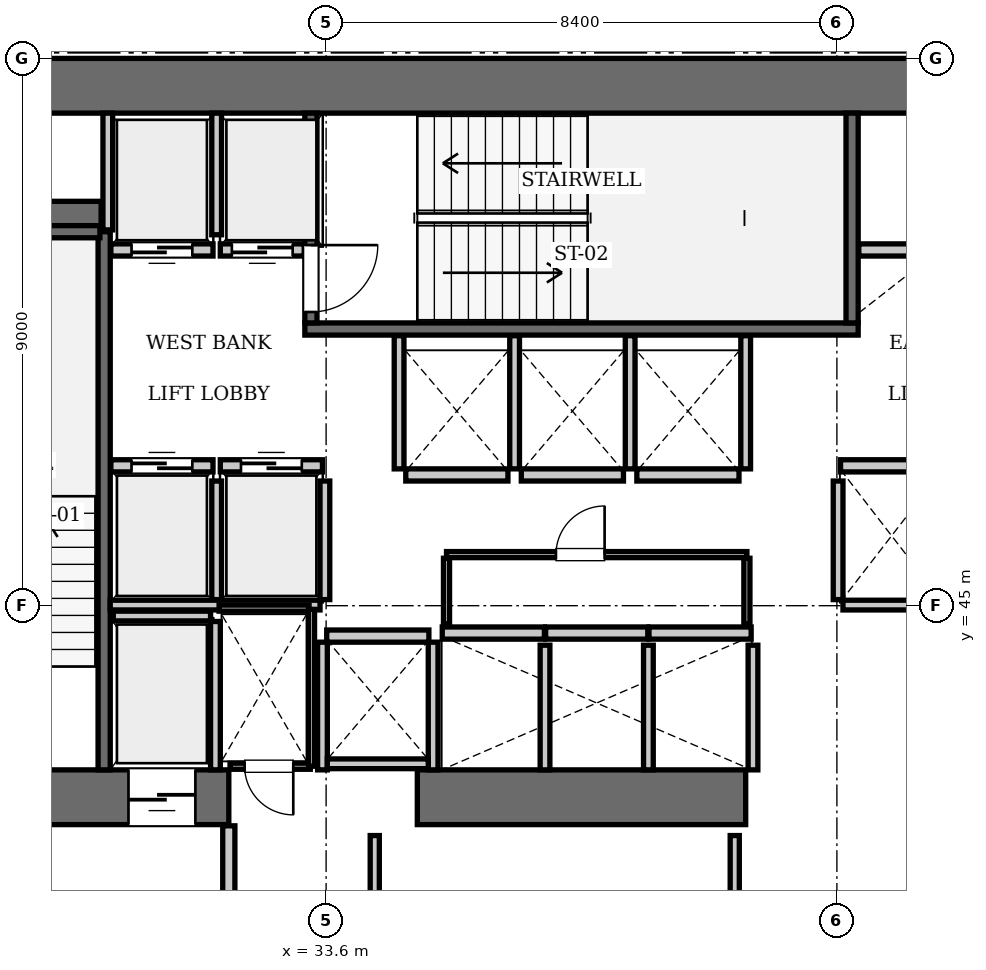
"""IFC4 building model, lengths in metres.
Left out: names, types, materials, properties, quantities, classifications, styles, units other than length and angle.
Written with IfcOpenShell. Run it as: python <this file> out.ifc"""

import sys

from ifc_helpers import new_model, si_unit, direction, frame, frame_2d, origin, place, context, subcontext, project, spatial, rectangle, extrude, element, fill, save


model = new_model("IFC4")
c1 = context("Model", 3, precision=1e-05, world=origin(), true_north=direction((0.0, 1.0)))
c2 = subcontext(c1, "Body", "Model", "MODEL_VIEW")
j1 = project(units=[si_unit("LENGTHUNIT", "METRE"), si_unit("PLANEANGLEUNIT", "RADIAN")], contexts=[c1])
p1 = place(None, origin())
s1 = spatial("IfcSite", under=j1, at=p1, CompositionType="ELEMENT")
p2 = place(p1, origin())
s2 = spatial("IfcBuilding", under=s1, at=p2, CompositionType="ELEMENT")
p3 = place(p2, frame((0.0, 0.0, 100.1)))
s3 = spatial("IfcBuildingStorey", under=s2, at=p3, CompositionType="ELEMENT", Elevation=100.1)
p4 = place(p3, frame((25.2, 53.55, 0.0), z_axis=(0.0, 0.0, 1.0), x_axis=(1.0, 0.0, 0.0)))
e1 = element("IfcWall", 1, at=p4, inside=s3, PredefinedType="SHEAR", context=c2, shape_type="SweptSolid", body=[
    extrude(rectangle(XDim=25.2, YDim=0.9, at=frame_2d((12.6, 0.0))), origin(), (0.0, 0.0, 1.0), 3.85),
])
p5 = place(p3, frame((25.2, 41.85, 0.0), z_axis=(0.0, 0.0, 1.0), x_axis=(1.0, 0.0, 0.0)))
e2 = element("IfcWall", 2, at=p5, inside=s3, PredefinedType="SHEAR", context=c2, shape_type="SweptSolid", body=[
    extrude(rectangle(XDim=6.8, YDim=0.9, at=frame_2d((3.4, 0.0))), origin(), (0.0, 0.0, 1.0), 3.85),
])
p6 = place(p5, frame((1.65, 0.0, 0.0)))
e3 = element("IfcOpeningElement", 3, at=p6, cuts=e2, PredefinedType="OPENING", context=c2, shape_type="SweptSolid", body=[
    extrude(rectangle(XDim=1.15, YDim=2.15, at=frame_2d((0.575, 1.075))), frame((0.0, 0.46, 0.0), z_axis=(0.0, -1.0, 0.0), x_axis=(1.0, 0.0, 0.0)), (0.0, 0.0, 1.0), 0.92),
])
p7 = place(p5, frame((5.15, 0.0, 0.0)))
e4 = element("IfcOpeningElement", 4, at=p7, cuts=e2, PredefinedType="OPENING", context=c2, shape_type="SweptSolid", body=[
    extrude(rectangle(XDim=1.1, YDim=2.2, at=frame_2d((0.55, 1.1))), frame((0.0, 0.46, 0.0), z_axis=(0.0, -1.0, 0.0), x_axis=(1.0, 0.0, 0.0)), (0.0, 0.0, 1.0), 0.92),
])
p8 = place(p3, frame((35.1, 41.85, 0.0), z_axis=(0.0, 0.0, 1.0), x_axis=(1.0, 0.0, 0.0)))
e5 = element("IfcWall", 5, at=p8, inside=s3, PredefinedType="SHEAR", context=c2, shape_type="SweptSolid", body=[
    extrude(rectangle(XDim=5.4, YDim=0.9, at=frame_2d((2.7, 0.0))), origin(), (0.0, 0.0, 1.0), 3.85),
])
p9 = place(p3, frame((26.1, 51.4, 0.0), z_axis=(0.0, 0.0, 1.0), x_axis=(1.0, 0.0, 0.0)))
e6 = element("IfcWall", 6, at=p9, inside=s3, PredefinedType="SHEAR", context=c2, shape_type="SweptSolid", body=[
    extrude(rectangle(XDim=3.8, YDim=0.5, at=frame_2d((1.9, 0.0))), origin(), (0.0, 0.0, 1.0), 3.85),
])
p10 = place(p3, frame((29.95, 42.3, 0.0), z_axis=(0.0, 0.0, 1.0), x_axis=(0.0, 1.0, 0.0)))
e7 = element("IfcWall", 7, at=p10, inside=s3, PredefinedType="SOLIDWALL", context=c2, shape_type="SweptSolid", body=[
    extrude(rectangle(XDim=8.85, YDim=0.2, at=frame_2d((4.425, 0.0))), origin(), (0.0, 0.0, 1.0), 3.61),
])
p11 = place(p3, frame((26.38, 51.15, 0.0), z_axis=(0.0, 0.0, 1.0), x_axis=(1.0, 0.0, 0.0)))
e8 = element("IfcWall", 8, at=p11, inside=s3, PredefinedType="SOLIDWALL", context=c2, shape_type="SweptSolid", body=[
    extrude(rectangle(XDim=3.5, YDim=0.2, at=frame_2d((1.75, 0.0))), origin(), (0.0, 0.0, 1.0), 3.61),
])
p12 = place(p3, frame((33.25, 49.55, 0.0), z_axis=(0.0, 0.0, 1.0), x_axis=(1.0, 0.0, 0.0)))
e9 = element("IfcWall", 9, at=p12, inside=s3, PredefinedType="SOLIDWALL", context=c2, shape_type="SweptSolid", body=[
    extrude(rectangle(XDim=9.1, YDim=0.2, at=frame_2d((4.55, 0.0))), origin(), (0.0, 0.0, 1.0), 3.61),
])
p13 = place(p3, frame((42.25, 49.65, 0.0), z_axis=(0.0, 0.0, 1.0), x_axis=(0.0, 1.0, 0.0)))
e10 = element("IfcWall", 10, at=p13, inside=s3, PredefinedType="SOLIDWALL", context=c2, shape_type="SweptSolid", body=[
    extrude(rectangle(XDim=3.45, YDim=0.2, at=frame_2d((1.725, 0.0))), origin(), (0.0, 0.0, 1.0), 3.61),
])
p14 = place(p3, frame((33.35, 49.65, 0.0), z_axis=(0.0, 0.0, 1.0), x_axis=(0.0, 1.0, 0.0)))
e11 = element("IfcWall", 11, at=p14, inside=s3, PredefinedType="SOLIDWALL", context=c2, shape_type="SweptSolid", body=[
    extrude(rectangle(XDim=3.45, YDim=0.2, at=frame_2d((1.725, 0.0))), origin(), (0.0, 0.0, 1.0), 3.61),
])
p15 = place(p14, frame((0.18, 0.0, 0.0)))
e12 = element("IfcOpeningElement", 12, at=p15, cuts=e11, PredefinedType="OPENING", context=c2, shape_type="SweptSolid", body=[
    extrude(rectangle(XDim=1.1, YDim=2.15, at=frame_2d((0.55, 1.075))), frame((0.0, 0.11, 0.0), z_axis=(0.0, -1.0, 0.0), x_axis=(1.0, 0.0, 0.0)), (0.0, 0.0, 1.0), 0.22),
])
p16 = place(p3, frame((30.06, 47.3, 0.0), z_axis=(0.0, 0.0, 1.0), x_axis=(1.0, 0.0, 0.0)))
e13 = element("IfcWall", 13, at=p16, inside=s3, PredefinedType="SOLIDWALL", context=c2, shape_type="SweptSolid", body=[
    extrude(rectangle(XDim=1.68, YDim=0.2, at=frame_2d((0.84, 0.0))), origin(), (0.0, 0.0, 1.0), 3.61),
])
p17 = place(p16, frame((0.34, 0.0, 0.0)))
e14 = element("IfcOpeningElement", 14, at=p17, cuts=e13, PredefinedType="OPENING", context=c2, shape_type="SweptSolid", body=[
    extrude(rectangle(XDim=1.0, YDim=2.15, at=frame_2d((0.5, 1.075))), frame((0.0, 0.11, 0.0), z_axis=(0.0, -1.0, 0.0), x_axis=(1.0, 0.0, 0.0)), (0.0, 0.0, 1.0), 0.22),
])
p18 = place(p3, frame((31.86, 47.3, 0.0), z_axis=(0.0, 0.0, 1.0), x_axis=(1.0, 0.0, 0.0)))
e15 = element("IfcWall", 15, at=p18, inside=s3, PredefinedType="SOLIDWALL", context=c2, shape_type="SweptSolid", body=[
    extrude(rectangle(XDim=1.68, YDim=0.2, at=frame_2d((0.84, 0.0))), origin(), (0.0, 0.0, 1.0), 3.61),
])
p19 = place(p18, frame((0.34, 0.0, 0.0)))
e16 = element("IfcOpeningElement", 16, at=p19, cuts=e15, PredefinedType="OPENING", context=c2, shape_type="SweptSolid", body=[
    extrude(rectangle(XDim=1.0, YDim=2.15, at=frame_2d((0.5, 1.075))), frame((0.0, 0.11, 0.0), z_axis=(0.0, -1.0, 0.0), x_axis=(1.0, 0.0, 0.0)), (0.0, 0.0, 1.0), 0.22),
])
p20 = place(p3, frame((30.06, 50.85, 0.0), z_axis=(0.0, 0.0, 1.0), x_axis=(1.0, 0.0, 0.0)))
e17 = element("IfcWall", 17, at=p20, inside=s3, PredefinedType="SOLIDWALL", context=c2, shape_type="SweptSolid", body=[
    extrude(rectangle(XDim=1.68, YDim=0.2, at=frame_2d((0.84, 0.0))), origin(), (0.0, 0.0, 1.0), 3.61),
])
p21 = place(p20, frame((0.34, 0.0, 0.0)))
e18 = element("IfcOpeningElement", 18, at=p21, cuts=e17, PredefinedType="OPENING", context=c2, shape_type="SweptSolid", body=[
    extrude(rectangle(XDim=1.0, YDim=2.15, at=frame_2d((0.5, 1.075))), frame((0.0, 0.11, 0.0), z_axis=(0.0, -1.0, 0.0), x_axis=(1.0, 0.0, 0.0)), (0.0, 0.0, 1.0), 0.22),
])
p22 = place(p3, frame((31.86, 50.85, 0.0), z_axis=(0.0, 0.0, 1.0), x_axis=(1.0, 0.0, 0.0)))
e19 = element("IfcWall", 19, at=p22, inside=s3, PredefinedType="SOLIDWALL", context=c2, shape_type="SweptSolid", body=[
    extrude(rectangle(XDim=1.38, YDim=0.2, at=frame_2d((0.69, 0.0))), origin(), (0.0, 0.0, 1.0), 3.61),
])
p23 = place(p22, frame((0.19, 0.0, 0.0)))
e20 = element("IfcOpeningElement", 20, at=p23, cuts=e19, PredefinedType="OPENING", context=c2, shape_type="SweptSolid", body=[
    extrude(rectangle(XDim=1.0, YDim=2.15, at=frame_2d((0.5, 1.075))), frame((0.0, 0.11, 0.0), z_axis=(0.0, -1.0, 0.0), x_axis=(1.0, 0.0, 0.0)), (0.0, 0.0, 1.0), 0.22),
])
p24 = place(p3, frame((42.06, 47.3, 0.0), z_axis=(0.0, 0.0, 1.0), x_axis=(1.0, 0.0, 0.0)))
e21 = element("IfcWall", 21, at=p24, inside=s3, PredefinedType="SOLIDWALL", context=c2, shape_type="SweptSolid", body=[
    extrude(rectangle(XDim=1.68, YDim=0.2, at=frame_2d((0.84, 0.0))), origin(), (0.0, 0.0, 1.0), 3.61),
])
p25 = place(p3, frame((42.36, 50.85, 0.0), z_axis=(0.0, 0.0, 1.0), x_axis=(1.0, 0.0, 0.0)))
e22 = element("IfcWall", 22, at=p25, inside=s3, PredefinedType="SOLIDWALL", context=c2, shape_type="SweptSolid", body=[
    extrude(rectangle(XDim=1.38, YDim=0.2, at=frame_2d((0.69, 0.0))), origin(), (0.0, 0.0, 1.0), 3.61),
])
for number, where, z_axis, x_axis in (
    (23, (35.51, 44.55, 0.0), (0.0, 0.0, 1.0), (1.0, 0.0, 0.0)),
    (24, (37.21, 44.55, 0.0), (0.0, 0.0, 1.0), (1.0, 0.0, 0.0)),
):
    element("IfcWall", number, at=place(p3, frame(where, z_axis=z_axis, x_axis=x_axis)), inside=s3, PredefinedType="SOLIDWALL", context=c2, shape_type="SweptSolid", body=[
        extrude(rectangle(XDim=1.68, YDim=0.2, at=frame_2d((0.84, 0.0))), origin(), (0.0, 0.0, 1.0), 3.61),
    ])
for number, where, z_axis, x_axis in (
    (25, (38.91, 44.55, 0.0), (0.0, 0.0, 1.0), (1.0, 0.0, 0.0)),
    (26, (34.91, 47.15, 0.0), (0.0, 0.0, 1.0), (1.0, 0.0, 0.0)),
):
    element("IfcWall", number, at=place(p3, frame(where, z_axis=z_axis, x_axis=x_axis)), inside=s3, PredefinedType="SOLIDWALL", context=c2, shape_type="SweptSolid", body=[
        extrude(rectangle(XDim=1.68, YDim=0.2, at=frame_2d((0.84, 0.0))), origin(), (0.0, 0.0, 1.0), 3.61),
    ])
for number, where, z_axis, x_axis in (
    (27, (36.81, 47.15, 0.0), (0.0, 0.0, 1.0), (1.0, 0.0, 0.0)),
    (28, (38.71, 47.15, 0.0), (0.0, 0.0, 1.0), (1.0, 0.0, 0.0)),
    (29, (33.61, 44.5, 0.0), (0.0, 0.0, 1.0), (1.0, 0.0, 0.0)),
):
    element("IfcWall", number, at=place(p3, frame(where, z_axis=z_axis, x_axis=x_axis)), inside=s3, PredefinedType="SOLIDWALL", context=c2, shape_type="SweptSolid", body=[
        extrude(rectangle(XDim=1.68, YDim=0.2, at=frame_2d((0.84, 0.0))), origin(), (0.0, 0.0, 1.0), 3.61),
    ])
p26 = place(p3, frame((30.1, 44.83, 0.0), z_axis=(0.0, 0.0, 1.0), x_axis=(1.0, 0.0, 0.0)))
e30 = element("IfcWall", 30, at=p26, inside=s3, PredefinedType="SOLIDWALL", context=c2, shape_type="SweptSolid", body=[
    extrude(rectangle(XDim=1.6, YDim=0.16, at=frame_2d((0.8, 0.0))), origin(), (0.0, 0.0, 1.0), 3.61),
])
p27 = place(p3, frame((31.78, 42.3, 0.0), z_axis=(0.0, 0.0, 1.0), x_axis=(0.0, 1.0, 0.0)))
e31 = element("IfcWall", 31, at=p27, inside=s3, PredefinedType="SOLIDWALL", context=c2, shape_type="SweptSolid", body=[
    extrude(rectangle(XDim=2.44, YDim=0.16, at=frame_2d((1.22, 0.0))), origin(), (0.0, 0.0, 1.0), 3.61),
])
for number, where, z_axis, x_axis in (
    (32, (31.8, 45.1, 0.0), (0.0, 0.0, 1.0), (0.0, 1.0, 0.0)),
    (33, (33.58, 45.1, 0.0), (0.0, 0.0, 1.0), (0.0, 1.0, 0.0)),
):
    element("IfcWall", number, at=place(p3, frame(where, z_axis=z_axis, x_axis=x_axis)), inside=s3, PredefinedType="SOLIDWALL", context=c2, shape_type="SweptSolid", body=[
        extrude(rectangle(XDim=1.95, YDim=0.16, at=frame_2d((0.975, 0.0))), origin(), (0.0, 0.0, 1.0), 3.61),
    ])
p28 = place(p3, frame((30.05, 45.01, 0.0), z_axis=(0.0, 0.0, 1.0), x_axis=(1.0, 0.0, 0.0)))
e34 = element("IfcWall", 34, at=p28, inside=s3, PredefinedType="SOLIDWALL", context=c2, shape_type="SweptSolid", body=[
    extrude(rectangle(XDim=3.45, YDim=0.16, at=frame_2d((1.725, 0.0))), origin(), (0.0, 0.0, 1.0), 3.61),
])
p29 = place(p3, frame((30.01, 51.18, 0.0), z_axis=(0.0, 0.0, 1.0), x_axis=(0.0, 1.0, 0.0)))
e35 = element("IfcWall", 35, at=p29, inside=s3, PredefinedType="SOLIDWALL", context=c2, shape_type="SweptSolid", body=[
    extrude(rectangle(XDim=1.92, YDim=0.16, at=frame_2d((0.96, 0.0))), origin(), (0.0, 0.0, 1.0), 3.61),
])
p30 = place(p3, frame((31.8, 51.1, 0.0), z_axis=(0.0, 0.0, 1.0), x_axis=(0.0, 1.0, 0.0)))
e36 = element("IfcWall", 36, at=p30, inside=s3, PredefinedType="SOLIDWALL", context=c2, shape_type="SweptSolid", body=[
    extrude(rectangle(XDim=2.0, YDim=0.16, at=frame_2d((1.0, 0.0))), origin(), (0.0, 0.0, 1.0), 3.61),
])
p31 = place(p3, frame((42.02, 45.1, 0.0), z_axis=(0.0, 0.0, 1.0), x_axis=(0.0, 1.0, 0.0)))
e37 = element("IfcWall", 37, at=p31, inside=s3, PredefinedType="SOLIDWALL", context=c2, shape_type="SweptSolid", body=[
    extrude(rectangle(XDim=1.95, YDim=0.16, at=frame_2d((0.975, 0.0))), origin(), (0.0, 0.0, 1.0), 3.61),
])
p32 = place(p3, frame((42.1, 45.01, 0.0), z_axis=(0.0, 0.0, 1.0), x_axis=(1.0, 0.0, 0.0)))
e38 = element("IfcWall", 38, at=p32, inside=s3, PredefinedType="SOLIDWALL", context=c2, shape_type="SweptSolid", body=[
    extrude(rectangle(XDim=3.45, YDim=0.16, at=frame_2d((1.725, 0.0))), origin(), (0.0, 0.0, 1.0), 3.61),
])
for number, where, z_axis, x_axis in (
    (39, (37.2, 42.3, 0.0), (0.0, 0.0, 1.0), (0.0, 1.0, 0.0)),
    (40, (38.9, 42.3, 0.0), (0.0, 0.0, 1.0), (0.0, 1.0, 0.0)),
    (41, (40.62, 42.3, 0.0), (0.0, 0.0, 1.0), (0.0, 1.0, 0.0)),
):
    element("IfcWall", number, at=place(p3, frame(where, z_axis=z_axis, x_axis=x_axis)), inside=s3, PredefinedType="SOLIDWALL", context=c2, shape_type="SweptSolid", body=[
        extrude(rectangle(XDim=2.05, YDim=0.16, at=frame_2d((1.025, 0.0))), origin(), (0.0, 0.0, 1.0), 3.61),
    ])
for number, where, z_axis, x_axis in (
    (42, (34.8, 47.25, 0.0), (0.0, 0.0, 1.0), (0.0, 1.0, 0.0)),
    (43, (36.7, 47.25, 0.0), (0.0, 0.0, 1.0), (0.0, 1.0, 0.0)),
    (44, (38.6, 47.25, 0.0), (0.0, 0.0, 1.0), (0.0, 1.0, 0.0)),
    (45, (40.5, 47.25, 0.0), (0.0, 0.0, 1.0), (0.0, 1.0, 0.0)),
):
    element("IfcWall", number, at=place(p3, frame(where, z_axis=z_axis, x_axis=x_axis)), inside=s3, PredefinedType="SOLIDWALL", context=c2, shape_type="SweptSolid", body=[
        extrude(rectangle(XDim=2.19, YDim=0.16, at=frame_2d((1.095, 0.0))), origin(), (0.0, 0.0, 1.0), 3.61),
    ])
for number, where, z_axis, x_axis in (
    (46, (33.54, 42.3, 0.0), (0.0, 0.0, 1.0), (0.0, 1.0, 0.0)),
    (47, (35.36, 42.3, 0.0), (0.0, 0.0, 1.0), (0.0, 1.0, 0.0)),
):
    element("IfcWall", number, at=place(p3, frame(where, z_axis=z_axis, x_axis=x_axis)), inside=s3, PredefinedType="SOLIDWALL", context=c2, shape_type="SweptSolid", body=[
        extrude(rectangle(XDim=2.1, YDim=0.16, at=frame_2d((1.05, 0.0))), origin(), (0.0, 0.0, 1.0), 3.61),
    ])
p33 = place(p3, frame((33.62, 42.4, 0.0), z_axis=(0.0, 0.0, 1.0), x_axis=(1.0, 0.0, 0.0)))
e48 = element("IfcWall", 48, at=p33, inside=s3, PredefinedType="SOLIDWALL", context=c2, shape_type="SweptSolid", body=[
    extrude(rectangle(XDim=1.66, YDim=0.16, at=frame_2d((0.83, 0.0))), origin(), (0.0, 0.0, 1.0), 3.61),
])
p34 = place(p3, frame((32.0, 38.31, 0.0), z_axis=(0.0, 0.0, 1.0), x_axis=(0.0, 1.0, 0.0)))
e49 = element("IfcWall", 49, at=p34, inside=s3, PredefinedType="PARTITIONING", context=c2, shape_type="SweptSolid", body=[
    extrude(rectangle(XDim=3.07, YDim=0.2, at=frame_2d((1.535, 0.0))), origin(), (0.0, 0.0, 1.0), 3.61),
])
p35 = place(p3, frame((32.02, 42.36, 0.0), z_axis=(0.0, 0.0, 1.0), x_axis=(1.0, 0.0, 0.0)))
e50 = element("IfcWall", 50, at=p35, inside=s3, PredefinedType="PARTITIONING", context=c2, shape_type="SweptSolid", body=[
    extrude(rectangle(XDim=1.32, YDim=0.1, at=frame_2d((0.66, 0.0))), origin(), (0.0, 0.0, 1.0), 3.61),
])
p36 = place(p35, frame((0.24, 0.0, 0.0)))
e51 = element("IfcOpeningElement", 51, at=p36, cuts=e50, PredefinedType="OPENING", context=c2, shape_type="SweptSolid", body=[
    extrude(rectangle(XDim=0.8, YDim=2.05, at=frame_2d((0.4, 1.025))), frame((0.0, 0.06, 0.0), z_axis=(0.0, -1.0, 0.0), x_axis=(1.0, 0.0, 0.0)), (0.0, 0.0, 1.0), 0.12),
])
p37 = place(p3, frame((31.84, 44.96, 0.0), z_axis=(0.0, 0.0, 1.0), x_axis=(1.0, 0.0, 0.0)))
e52 = element("IfcWall", 52, at=p37, inside=s3, PredefinedType="PARTITIONING", context=c2, shape_type="SweptSolid", body=[
    extrude(rectangle(XDim=1.48, YDim=0.1, at=frame_2d((0.74, 0.0))), origin(), (0.0, 0.0, 1.0), 3.61),
])
p38 = place(p3, frame((33.36, 42.36, 0.0), z_axis=(0.0, 0.0, 1.0), x_axis=(0.0, 1.0, 0.0)))
e53 = element("IfcWall", 53, at=p38, inside=s3, PredefinedType="PARTITIONING", context=c2, shape_type="SweptSolid", body=[
    extrude(rectangle(XDim=2.58, YDim=0.1, at=frame_2d((1.29, 0.0))), origin(), (0.0, 0.0, 1.0), 3.61),
])
p39 = place(p3, frame((35.58, 45.84, 0.0), z_axis=(0.0, 0.0, 1.0), x_axis=(1.0, 0.0, 0.0)))
e54 = element("IfcWall", 54, at=p39, inside=s3, PredefinedType="PARTITIONING", context=c2, shape_type="SweptSolid", body=[
    extrude(rectangle(XDim=4.94, YDim=0.1, at=frame_2d((2.47, 0.0))), origin(), (0.0, 0.0, 1.0), 3.61),
])
p40 = place(p39, frame((1.8, 0.0, 0.0)))
e55 = element("IfcOpeningElement", 55, at=p40, cuts=e54, PredefinedType="OPENING", context=c2, shape_type="SweptSolid", body=[
    extrude(rectangle(XDim=0.8, YDim=2.05, at=frame_2d((0.4, 1.025))), frame((0.0, 0.06, 0.0), z_axis=(0.0, -1.0, 0.0), x_axis=(1.0, 0.0, 0.0)), (0.0, 0.0, 1.0), 0.12),
])
for number, where, z_axis, x_axis in (
    (56, (35.58, 44.7, 0.0), (0.0, 0.0, 1.0), (0.0, 1.0, 0.0)),
    (57, (40.52, 44.7, 0.0), (0.0, 0.0, 1.0), (0.0, 1.0, 0.0)),
):
    element("IfcWall", number, at=place(p3, frame(where, z_axis=z_axis, x_axis=x_axis)), inside=s3, PredefinedType="PARTITIONING", context=c2, shape_type="SweptSolid", body=[
        extrude(rectangle(XDim=1.08, YDim=0.1, at=frame_2d((0.54, 0.0))), origin(), (0.0, 0.0, 1.0), 3.61),
    ])
for number, where, z_axis, x_axis in (
    (58, (34.4, 38.38, 0.0), (0.0, 0.0, 1.0), (0.0, 1.0, 0.0)),
    (59, (40.32, 38.38, 0.0), (0.0, 0.0, 1.0), (0.0, 1.0, 0.0)),
):
    element("IfcWall", number, at=place(p3, frame(where, z_axis=z_axis, x_axis=x_axis)), inside=s3, PredefinedType="PARTITIONING", context=c2, shape_type="SweptSolid", body=[
        extrude(rectangle(XDim=2.84, YDim=0.15, at=frame_2d((1.42, 0.0))), origin(), (0.0, 0.0, 1.0), 3.61),
    ])
p41 = place(p15, frame((1.1, 0.0, 0.0), z_axis=(0.0, 0.0, 1.0), x_axis=(-1.0, 0.0, 0.0)))
e60 = element("IfcDoor", 60, at=p41, inside=s3, OperationType="SINGLE_SWING_LEFT", PredefinedType="DOOR", context=c2, shape_type="SweptSolid", body=[
    extrude(rectangle(XDim=1.1, YDim=2.15, at=frame_2d((0.55, 1.075))), frame((0.0, 0.025, 0.0), z_axis=(0.0, -1.0, 0.0), x_axis=(1.0, 0.0, 0.0)), (0.0, 0.0, 1.0), 0.05),
])
fill(e12, e60)
p42 = place(p17, origin())
e61 = element("IfcDoor", 61, at=p42, inside=s3, OperationType="SLIDING_TO_LEFT", PredefinedType="DOOR", context=c2, shape_type="SweptSolid", body=[
    extrude(rectangle(XDim=1.0, YDim=2.15, at=frame_2d((0.5, 1.075))), frame((0.0, 0.025, 0.0), z_axis=(0.0, -1.0, 0.0), x_axis=(1.0, 0.0, 0.0)), (0.0, 0.0, 1.0), 0.05),
])
fill(e14, e61)
p43 = place(p19, origin())
e62 = element("IfcDoor", 62, at=p43, inside=s3, OperationType="SLIDING_TO_LEFT", PredefinedType="DOOR", context=c2, shape_type="SweptSolid", body=[
    extrude(rectangle(XDim=1.0, YDim=2.15, at=frame_2d((0.5, 1.075))), frame((0.0, 0.025, 0.0), z_axis=(0.0, -1.0, 0.0), x_axis=(1.0, 0.0, 0.0)), (0.0, 0.0, 1.0), 0.05),
])
fill(e16, e62)
p44 = place(p21, frame((1.0, 0.0, 0.0), z_axis=(0.0, 0.0, 1.0), x_axis=(-1.0, 0.0, 0.0)))
e63 = element("IfcDoor", 63, at=p44, inside=s3, OperationType="SLIDING_TO_LEFT", PredefinedType="DOOR", context=c2, shape_type="SweptSolid", body=[
    extrude(rectangle(XDim=1.0, YDim=2.15, at=frame_2d((0.5, 1.075))), frame((0.0, 0.025, 0.0), z_axis=(0.0, -1.0, 0.0), x_axis=(1.0, 0.0, 0.0)), (0.0, 0.0, 1.0), 0.05),
])
fill(e18, e63)
p45 = place(p23, frame((1.0, 0.0, 0.0), z_axis=(0.0, 0.0, 1.0), x_axis=(-1.0, 0.0, 0.0)))
e64 = element("IfcDoor", 64, at=p45, inside=s3, OperationType="SLIDING_TO_LEFT", PredefinedType="DOOR", context=c2, shape_type="SweptSolid", body=[
    extrude(rectangle(XDim=1.0, YDim=2.15, at=frame_2d((0.5, 1.075))), frame((0.0, 0.025, 0.0), z_axis=(0.0, -1.0, 0.0), x_axis=(1.0, 0.0, 0.0)), (0.0, 0.0, 1.0), 0.05),
])
fill(e20, e64)
p46 = place(p7, frame((1.1, 0.0, 0.0), z_axis=(0.0, 0.0, 1.0), x_axis=(-1.0, 0.0, 0.0)))
e65 = element("IfcDoor", 65, at=p46, inside=s3, OperationType="SLIDING_TO_LEFT", PredefinedType="DOOR", context=c2, shape_type="SweptSolid", body=[
    extrude(rectangle(XDim=1.1, YDim=2.2, at=frame_2d((0.55, 1.1))), frame((0.0, 0.025, 0.0), z_axis=(0.0, -1.0, 0.0), x_axis=(1.0, 0.0, 0.0)), (0.0, 0.0, 1.0), 0.05),
])
fill(e4, e65)
p47 = place(p36, frame((0.8, 0.0, 0.0), z_axis=(0.0, 0.0, 1.0), x_axis=(-1.0, 0.0, 0.0)))
e66 = element("IfcDoor", 66, at=p47, inside=s3, OperationType="SINGLE_SWING_LEFT", PredefinedType="DOOR", context=c2, shape_type="SweptSolid", body=[
    extrude(rectangle(XDim=0.8, YDim=2.05, at=frame_2d((0.4, 1.025))), frame((0.0, 0.025, 0.0), z_axis=(0.0, -1.0, 0.0), x_axis=(1.0, 0.0, 0.0)), (0.0, 0.0, 1.0), 0.05),
])
fill(e51, e66)
p48 = place(p40, origin())
e67 = element("IfcDoor", 67, at=p48, inside=s3, OperationType="SINGLE_SWING_RIGHT", PredefinedType="DOOR", context=c2, shape_type="SweptSolid", body=[
    extrude(rectangle(XDim=0.8, YDim=2.05, at=frame_2d((0.4, 1.025))), frame((0.0, 0.025, 0.0), z_axis=(0.0, -1.0, 0.0), x_axis=(1.0, 0.0, 0.0)), (0.0, 0.0, 1.0), 0.05),
])
fill(e55, e67)
save(model, sys.argv[1])
